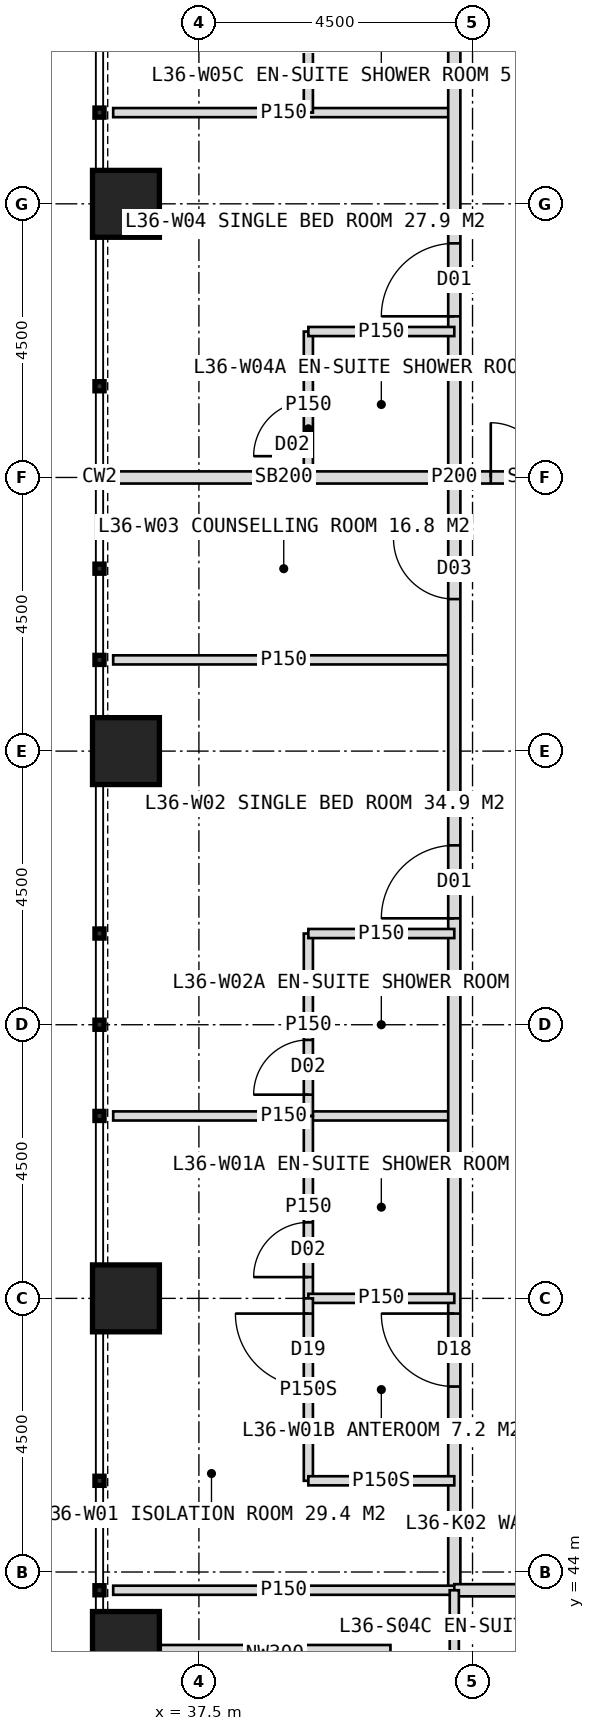
"""IFC4 building model, lengths in metres.
Left out: names, types, materials, properties, quantities, classifications, styles, units other than length and angle.
Written with IfcOpenShell. Run it as: python <this file> out.ifc"""

import sys

from ifc_helpers import new_model, si_unit, direction, frame, frame_2d, origin, origin_2d, place, context, subcontext, project, spatial, rectangle, hollow_rectangle, extrude, element, fill, save


model = new_model("IFC4")
c1 = context("Model", 3, precision=1e-05, world=origin(), true_north=direction((0.0, 1.0)))
c2 = subcontext(c1, "Body", "Model", "MODEL_VIEW")
j1 = project(units=[si_unit("LENGTHUNIT", "METRE"), si_unit("PLANEANGLEUNIT", "RADIAN")], contexts=[c1])
p1 = place(None, origin())
s1 = spatial("IfcSite", under=j1, at=p1, CompositionType="ELEMENT")
p2 = place(p1, origin())
s2 = spatial("IfcBuilding", under=s1, at=p2, CompositionType="ELEMENT")
p3 = place(p2, frame((0.0, 0.0, 152.0)))
s3 = spatial("IfcBuildingStorey", under=s2, at=p3, CompositionType="ELEMENT", Elevation=152.0)
for number, where, z_axis, x_axis in (
    (1, (36.3, 42.8, 0.0), (0.0, 0.0, 1.0), (1.0, 0.0, 0.0)),
    (2, (36.3, 48.5, 0.0), (0.0, 0.0, 1.0), (1.0, 0.0, 0.0)),
    (3, (36.3, 57.5, 0.0), (0.0, 0.0, 1.0), (1.0, 0.0, 0.0)),
    (4, (36.3, 66.5, 0.0), (0.0, 0.0, 1.0), (1.0, 0.0, 0.0)),
):
    element("IfcColumn", number, at=place(p3, frame(where, z_axis=z_axis, x_axis=x_axis)), inside=s3, PredefinedType="COLUMN", context=c2, shape_type="SweptSolid", body=[
        extrude(hollow_rectangle(XDim=1.1, YDim=1.1, WallThickness=0.1, at=origin_2d()), origin(), (0.0, 0.0, 1.0), 4.0),
    ])
p4 = place(p3, frame((40.65, 42.65, 0.0), z_axis=(0.0, 0.0, 1.0), x_axis=(-1.0, 0.0, 0.0)))
e5 = element("IfcWall", 5, at=p4, inside=s3, PredefinedType="ELEMENTEDWALL", context=c2, shape_type="SweptSolid", body=[
    extrude(rectangle(XDim=3.8, YDim=0.3, at=frame_2d((1.9, 0.0))), origin(), (0.0, 0.0, 1.0), 4.0),
])
for number, where, z_axis, x_axis in (
    (6, (41.7, 51.5, 0.0), (0.0, 0.0, 1.0), (-1.0, 0.0, 0.0)),
    (7, (41.7, 59.0, 0.0), (0.0, 0.0, 1.0), (-1.0, 0.0, 0.0)),
):
    element("IfcWall", number, at=place(p3, frame(where, z_axis=z_axis, x_axis=x_axis)), inside=s3, PredefinedType="PARTITIONING", context=c2, shape_type="SweptSolid", body=[
        extrude(rectangle(XDim=5.61, YDim=0.15, at=frame_2d((2.805, 0.0))), origin(), (0.0, 0.0, 1.0), 3.75),
    ])
p5 = place(p3, frame((41.7, 62.0, 0.0), z_axis=(0.0, 0.0, 1.0), x_axis=(-1.0, 0.0, 0.0)))
e8 = element("IfcWall", 8, at=p5, inside=s3, PredefinedType="SOLIDWALL", context=c2, shape_type="SweptSolid", body=[
    extrude(rectangle(XDim=5.61, YDim=0.2, at=frame_2d((2.805, 0.0))), origin(), (0.0, 0.0, 1.0), 2.95),
])
p6 = place(p3, frame((41.7, 68.0, 0.0), z_axis=(0.0, 0.0, 1.0), x_axis=(-1.0, 0.0, 0.0)))
e9 = element("IfcWall", 9, at=p6, inside=s3, PredefinedType="PARTITIONING", context=c2, shape_type="SweptSolid", body=[
    extrude(rectangle(XDim=5.61, YDim=0.15, at=frame_2d((2.805, 0.0))), origin(), (0.0, 0.0, 1.0), 3.75),
])
p7 = place(p3, frame((41.7, 43.7, 0.0), z_axis=(0.0, 0.0, 1.0), x_axis=(0.0, 1.0, 0.0)))
e10 = element("IfcWall", 10, at=p7, inside=s3, PredefinedType="PARTITIONING", context=c2, shape_type="SweptSolid", body=[
    extrude(rectangle(XDim=36.6, YDim=0.2, at=frame_2d((18.3, 0.0))), origin(), (0.0, 0.0, 1.0), 3.75),
])
p8 = place(p7, frame((3.35, 0.0, 0.0)))
e11 = element("IfcOpeningElement", 11, at=p8, cuts=e10, PredefinedType="OPENING", context=c2, shape_type="SweptSolid", body=[
    extrude(rectangle(XDim=1.2, YDim=2.2, at=frame_2d((0.6, 1.1))), frame((0.0, 0.11, 0.0), z_axis=(0.0, -1.0, 0.0), x_axis=(1.0, 0.0, 0.0)), (0.0, 0.0, 1.0), 0.22),
])
p9 = place(p7, frame((11.05, 0.0, 0.0)))
e12 = element("IfcOpeningElement", 12, at=p9, cuts=e10, PredefinedType="OPENING", context=c2, shape_type="SweptSolid", body=[
    extrude(rectangle(XDim=1.2, YDim=2.2, at=frame_2d((0.6, 1.1))), frame((0.0, 0.11, 0.0), z_axis=(0.0, -1.0, 0.0), x_axis=(1.0, 0.0, 0.0)), (0.0, 0.0, 1.0), 0.22),
])
p10 = place(p7, frame((16.3, 0.0, 0.0)))
e13 = element("IfcOpeningElement", 13, at=p10, cuts=e10, PredefinedType="OPENING", context=c2, shape_type="SweptSolid", body=[
    extrude(rectangle(XDim=1.0, YDim=2.1, at=frame_2d((0.5, 1.05))), frame((0.0, 0.11, 0.0), z_axis=(0.0, -1.0, 0.0), x_axis=(1.0, 0.0, 0.0)), (0.0, 0.0, 1.0), 0.22),
])
p11 = place(p7, frame((20.95, 0.0, 0.0)))
e14 = element("IfcOpeningElement", 14, at=p11, cuts=e10, PredefinedType="OPENING", context=c2, shape_type="SweptSolid", body=[
    extrude(rectangle(XDim=1.2, YDim=2.2, at=frame_2d((0.6, 1.1))), frame((0.0, 0.11, 0.0), z_axis=(0.0, -1.0, 0.0), x_axis=(1.0, 0.0, 0.0)), (0.0, 0.0, 1.0), 0.22),
])
p12 = place(p7, frame((32.75, 0.0, 0.0)))
e15 = element("IfcOpeningElement", 15, at=p12, cuts=e10, PredefinedType="OPENING", context=c2, shape_type="SweptSolid", body=[
    extrude(rectangle(XDim=1.2, YDim=2.2, at=frame_2d((0.6, 1.1))), frame((0.0, 0.11, 0.0), z_axis=(0.0, -1.0, 0.0), x_axis=(1.0, 0.0, 0.0)), (0.0, 0.0, 1.0), 0.22),
])
p13 = place(p3, frame((41.7, 43.7, 0.0), z_axis=(0.0, 0.0, 1.0), x_axis=(-1.0, 0.0, 0.0)))
e16 = element("IfcWall", 16, at=p13, inside=s3, PredefinedType="PARTITIONING", context=c2, shape_type="SweptSolid", body=[
    extrude(rectangle(XDim=5.61, YDim=0.15, at=frame_2d((2.805, 0.0))), origin(), (0.0, 0.0, 1.0), 3.75),
])
p14 = place(p3, frame((39.3, 48.5, 0.0), z_axis=(0.0, 0.0, 1.0), x_axis=(0.0, 1.0, 0.0)))
e17 = element("IfcWall", 17, at=p14, inside=s3, PredefinedType="PARTITIONING", context=c2, shape_type="SweptSolid", body=[
    extrude(rectangle(XDim=3.0, YDim=0.15, at=frame_2d((1.5, 0.0))), origin(), (0.0, 0.0, 1.0), 3.75),
])
p15 = place(p14, frame((0.35, 0.0, 0.0)))
e18 = element("IfcOpeningElement", 18, at=p15, cuts=e17, PredefinedType="OPENING", context=c2, shape_type="SweptSolid", body=[
    extrude(rectangle(XDim=0.9, YDim=2.1, at=frame_2d((0.45, 1.05))), frame((0.0, 0.085, 0.0), z_axis=(0.0, -1.0, 0.0), x_axis=(1.0, 0.0, 0.0)), (0.0, 0.0, 1.0), 0.17),
])
p16 = place(p3, frame((41.7, 48.5, 0.0), z_axis=(0.0, 0.0, 1.0), x_axis=(-1.0, 0.0, 0.0)))
e19 = element("IfcWall", 19, at=p16, inside=s3, PredefinedType="PARTITIONING", context=c2, shape_type="SweptSolid", body=[
    extrude(rectangle(XDim=2.4, YDim=0.15, at=frame_2d((1.2, 0.0))), origin(), (0.0, 0.0, 1.0), 2.95),
])
p17 = place(p3, frame((39.3, 45.5, 0.0), z_axis=(0.0, 0.0, 1.0), x_axis=(0.0, 1.0, 0.0)))
e20 = element("IfcWall", 20, at=p17, inside=s3, PredefinedType="PARTITIONING", context=c2, shape_type="SweptSolid", body=[
    extrude(rectangle(XDim=3.0, YDim=0.15, at=frame_2d((1.5, 0.0))), origin(), (0.0, 0.0, 1.0), 3.75),
])
p18 = place(p17, frame((1.55, 0.0, 0.0)))
e21 = element("IfcOpeningElement", 21, at=p18, cuts=e20, PredefinedType="OPENING", context=c2, shape_type="SweptSolid", body=[
    extrude(rectangle(XDim=1.2, YDim=2.2, at=frame_2d((0.6, 1.1))), frame((0.0, 0.085, 0.0), z_axis=(0.0, -1.0, 0.0), x_axis=(1.0, 0.0, 0.0)), (0.0, 0.0, 1.0), 0.17),
])
p19 = place(p3, frame((41.7, 45.5, 0.0), z_axis=(0.0, 0.0, 1.0), x_axis=(-1.0, 0.0, 0.0)))
e22 = element("IfcWall", 22, at=p19, inside=s3, PredefinedType="PARTITIONING", context=c2, shape_type="SweptSolid", body=[
    extrude(rectangle(XDim=2.4, YDim=0.15, at=frame_2d((1.2, 0.0))), origin(), (0.0, 0.0, 1.0), 3.75),
])
p20 = place(p3, frame((39.3, 51.5, 0.0), z_axis=(0.0, 0.0, 1.0), x_axis=(0.0, 1.0, 0.0)))
e23 = element("IfcWall", 23, at=p20, inside=s3, PredefinedType="PARTITIONING", context=c2, shape_type="SweptSolid", body=[
    extrude(rectangle(XDim=3.0, YDim=0.15, at=frame_2d((1.5, 0.0))), origin(), (0.0, 0.0, 1.0), 3.75),
])
p21 = place(p20, frame((0.35, 0.0, 0.0)))
e24 = element("IfcOpeningElement", 24, at=p21, cuts=e23, PredefinedType="OPENING", context=c2, shape_type="SweptSolid", body=[
    extrude(rectangle(XDim=0.9, YDim=2.1, at=frame_2d((0.45, 1.05))), frame((0.0, 0.085, 0.0), z_axis=(0.0, -1.0, 0.0), x_axis=(1.0, 0.0, 0.0)), (0.0, 0.0, 1.0), 0.17),
])
p22 = place(p3, frame((41.7, 54.5, 0.0), z_axis=(0.0, 0.0, 1.0), x_axis=(-1.0, 0.0, 0.0)))
e25 = element("IfcWall", 25, at=p22, inside=s3, PredefinedType="PARTITIONING", context=c2, shape_type="SweptSolid", body=[
    extrude(rectangle(XDim=2.4, YDim=0.15, at=frame_2d((1.2, 0.0))), origin(), (0.0, 0.0, 1.0), 3.75),
])
p23 = place(p3, frame((39.3, 62.0, 0.0), z_axis=(0.0, 0.0, 1.0), x_axis=(0.0, 1.0, 0.0)))
e26 = element("IfcWall", 26, at=p23, inside=s3, PredefinedType="PARTITIONING", context=c2, shape_type="SweptSolid", body=[
    extrude(rectangle(XDim=2.4, YDim=0.15, at=frame_2d((1.2, 0.0))), origin(), (0.0, 0.0, 1.0), 3.75),
])
p24 = place(p23, frame((0.35, 0.0, 0.0)))
e27 = element("IfcOpeningElement", 27, at=p24, cuts=e26, PredefinedType="OPENING", context=c2, shape_type="SweptSolid", body=[
    extrude(rectangle(XDim=0.9, YDim=2.1, at=frame_2d((0.45, 1.05))), frame((0.0, 0.085, 0.0), z_axis=(0.0, -1.0, 0.0), x_axis=(1.0, 0.0, 0.0)), (0.0, 0.0, 1.0), 0.17),
])
p25 = place(p3, frame((41.7, 64.4, 0.0), z_axis=(0.0, 0.0, 1.0), x_axis=(-1.0, 0.0, 0.0)))
e28 = element("IfcWall", 28, at=p25, inside=s3, PredefinedType="PARTITIONING", context=c2, shape_type="SweptSolid", body=[
    extrude(rectangle(XDim=2.4, YDim=0.15, at=frame_2d((1.2, 0.0))), origin(), (0.0, 0.0, 1.0), 3.75),
])
p26 = place(p3, frame((39.3, 68.0, 0.0), z_axis=(0.0, 0.0, 1.0), x_axis=(0.0, 1.0, 0.0)))
e29 = element("IfcWall", 29, at=p26, inside=s3, PredefinedType="PARTITIONING", context=c2, shape_type="SweptSolid", body=[
    extrude(rectangle(XDim=2.4, YDim=0.15, at=frame_2d((1.2, 0.0))), origin(), (0.0, 0.0, 1.0), 3.75),
])
p27 = place(p26, frame((1.15, 0.0, 0.0)))
e30 = element("IfcOpeningElement", 30, at=p27, cuts=e29, PredefinedType="OPENING", context=c2, shape_type="SweptSolid", body=[
    extrude(rectangle(XDim=0.9, YDim=2.1, at=frame_2d((0.45, 1.05))), frame((0.0, 0.085, 0.0), z_axis=(0.0, -1.0, 0.0), x_axis=(1.0, 0.0, 0.0)), (0.0, 0.0, 1.0), 0.17),
])
p28 = place(p3, frame((78.3, 43.7, 0.0), z_axis=(0.0, 0.0, 1.0), x_axis=(-1.0, 0.0, 0.0)))
e31 = element("IfcWall", 31, at=p28, inside=s3, PredefinedType="PARTITIONING", context=c2, shape_type="SweptSolid", body=[
    extrude(rectangle(XDim=36.6, YDim=0.2, at=frame_2d((18.3, 0.0))), origin(), (0.0, 0.0, 1.0), 3.75),
])
p29 = place(p28, frame((3.35, 0.0, 0.0)))
e32 = element("IfcOpeningElement", 32, at=p29, cuts=e31, PredefinedType="OPENING", context=c2, shape_type="SweptSolid", body=[
    extrude(rectangle(XDim=1.2, YDim=2.2, at=frame_2d((0.6, 1.1))), frame((0.0, 0.11, 0.0), z_axis=(0.0, -1.0, 0.0), x_axis=(1.0, 0.0, 0.0)), (0.0, 0.0, 1.0), 0.22),
])
p30 = place(p28, frame((11.05, 0.0, 0.0)))
e33 = element("IfcOpeningElement", 33, at=p30, cuts=e31, PredefinedType="OPENING", context=c2, shape_type="SweptSolid", body=[
    extrude(rectangle(XDim=1.2, YDim=2.2, at=frame_2d((0.6, 1.1))), frame((0.0, 0.11, 0.0), z_axis=(0.0, -1.0, 0.0), x_axis=(1.0, 0.0, 0.0)), (0.0, 0.0, 1.0), 0.22),
])
p31 = place(p28, frame((19.85, 0.0, 0.0)))
e34 = element("IfcOpeningElement", 34, at=p31, cuts=e31, PredefinedType="OPENING", context=c2, shape_type="SweptSolid", body=[
    extrude(rectangle(XDim=1.2, YDim=2.2, at=frame_2d((0.6, 1.1))), frame((0.0, 0.11, 0.0), z_axis=(0.0, -1.0, 0.0), x_axis=(1.0, 0.0, 0.0)), (0.0, 0.0, 1.0), 0.22),
])
p32 = place(p28, frame((26.95, 0.0, 0.0)))
e35 = element("IfcOpeningElement", 35, at=p32, cuts=e31, PredefinedType="OPENING", context=c2, shape_type="SweptSolid", body=[
    extrude(rectangle(XDim=1.2, YDim=2.2, at=frame_2d((0.6, 1.1))), frame((0.0, 0.11, 0.0), z_axis=(0.0, -1.0, 0.0), x_axis=(1.0, 0.0, 0.0)), (0.0, 0.0, 1.0), 0.22),
])
p33 = place(p3, frame((41.7, 43.7, 0.0), z_axis=(0.0, 0.0, 1.0), x_axis=(0.0, -1.0, 0.0)))
e36 = element("IfcWall", 36, at=p33, inside=s3, PredefinedType="PARTITIONING", context=c2, shape_type="SweptSolid", body=[
    extrude(rectangle(XDim=2.4, YDim=0.15, at=frame_2d((1.2, 0.0))), origin(), (0.0, 0.0, 1.0), 3.75),
])
p34 = place(p3, frame((44.4, 62.0, 0.0), z_axis=(0.0, 0.0, 1.0), x_axis=(-1.0, 0.0, 0.0)))
e37 = element("IfcWall", 37, at=p34, inside=s3, PredefinedType="SOLIDWALL", context=c2, shape_type="SweptSolid", body=[
    extrude(rectangle(XDim=2.7, YDim=0.2, at=frame_2d((1.35, 0.0))), origin(), (0.0, 0.0, 1.0), 2.95),
])
p35 = place(p34, frame((0.3, 0.0, 0.0)))
e38 = element("IfcOpeningElement", 38, at=p35, cuts=e37, PredefinedType="OPENING", context=c2, shape_type="SweptSolid", body=[
    extrude(rectangle(XDim=1.8, YDim=2.2, at=frame_2d((0.9, 1.1))), frame((0.0, 0.11, 0.0), z_axis=(0.0, -1.0, 0.0), x_axis=(1.0, 0.0, 0.0)), (0.0, 0.0, 1.0), 0.22),
])
p36 = place(p18, origin())
e39 = element("IfcDoor", 39, at=p36, inside=s3, OperationType="SINGLE_SWING_RIGHT", PredefinedType="DOOR", context=c2, shape_type="SweptSolid", body=[
    extrude(rectangle(XDim=1.2, YDim=2.2, at=frame_2d((0.6, 1.1))), frame((0.0, 0.025, 0.0), z_axis=(0.0, -1.0, 0.0), x_axis=(1.0, 0.0, 0.0)), (0.0, 0.0, 1.0), 0.05),
])
fill(e21, e39)
p37 = place(p8, origin())
e40 = element("IfcDoor", 40, at=p37, inside=s3, OperationType="SINGLE_SWING_RIGHT", PredefinedType="DOOR", context=c2, shape_type="SweptSolid", body=[
    extrude(rectangle(XDim=1.2, YDim=2.2, at=frame_2d((0.6, 1.1))), frame((0.0, 0.025, 0.0), z_axis=(0.0, -1.0, 0.0), x_axis=(1.0, 0.0, 0.0)), (0.0, 0.0, 1.0), 0.05),
])
fill(e11, e40)
p38 = place(p15, origin())
e41 = element("IfcDoor", 41, at=p38, inside=s3, OperationType="SINGLE_SWING_LEFT", PredefinedType="DOOR", context=c2, shape_type="SweptSolid", body=[
    extrude(rectangle(XDim=0.9, YDim=2.1, at=frame_2d((0.45, 1.05))), frame((0.0, 0.025, 0.0), z_axis=(0.0, -1.0, 0.0), x_axis=(1.0, 0.0, 0.0)), (0.0, 0.0, 1.0), 0.05),
])
fill(e18, e41)
p39 = place(p9, origin())
e42 = element("IfcDoor", 42, at=p39, inside=s3, OperationType="SINGLE_SWING_LEFT", PredefinedType="DOOR", context=c2, shape_type="SweptSolid", body=[
    extrude(rectangle(XDim=1.2, YDim=2.2, at=frame_2d((0.6, 1.1))), frame((0.0, 0.025, 0.0), z_axis=(0.0, -1.0, 0.0), x_axis=(1.0, 0.0, 0.0)), (0.0, 0.0, 1.0), 0.05),
])
fill(e12, e42)
p40 = place(p21, origin())
e43 = element("IfcDoor", 43, at=p40, inside=s3, OperationType="SINGLE_SWING_LEFT", PredefinedType="DOOR", context=c2, shape_type="SweptSolid", body=[
    extrude(rectangle(XDim=0.9, YDim=2.1, at=frame_2d((0.45, 1.05))), frame((0.0, 0.025, 0.0), z_axis=(0.0, -1.0, 0.0), x_axis=(1.0, 0.0, 0.0)), (0.0, 0.0, 1.0), 0.05),
])
fill(e24, e43)
p41 = place(p10, origin())
e44 = element("IfcDoor", 44, at=p41, inside=s3, OperationType="SINGLE_SWING_RIGHT", PredefinedType="DOOR", context=c2, shape_type="SweptSolid", body=[
    extrude(rectangle(XDim=1.0, YDim=2.1, at=frame_2d((0.5, 1.05))), frame((0.0, 0.025, 0.0), z_axis=(0.0, -1.0, 0.0), x_axis=(1.0, 0.0, 0.0)), (0.0, 0.0, 1.0), 0.05),
])
fill(e13, e44)
p42 = place(p11, origin())
e45 = element("IfcDoor", 45, at=p42, inside=s3, OperationType="SINGLE_SWING_LEFT", PredefinedType="DOOR", context=c2, shape_type="SweptSolid", body=[
    extrude(rectangle(XDim=1.2, YDim=2.2, at=frame_2d((0.6, 1.1))), frame((0.0, 0.025, 0.0), z_axis=(0.0, -1.0, 0.0), x_axis=(1.0, 0.0, 0.0)), (0.0, 0.0, 1.0), 0.05),
])
fill(e14, e45)
p43 = place(p24, origin())
e46 = element("IfcDoor", 46, at=p43, inside=s3, OperationType="SINGLE_SWING_LEFT", PredefinedType="DOOR", context=c2, shape_type="SweptSolid", body=[
    extrude(rectangle(XDim=0.9, YDim=2.1, at=frame_2d((0.45, 1.05))), frame((0.0, 0.025, 0.0), z_axis=(0.0, -1.0, 0.0), x_axis=(1.0, 0.0, 0.0)), (0.0, 0.0, 1.0), 0.05),
])
fill(e27, e46)
p44 = place(p35, origin())
e47 = element("IfcDoor", 47, at=p44, inside=s3, OperationType="DOUBLE_DOOR_DOUBLE_SWING", PredefinedType="DOOR", context=c2, shape_type="SweptSolid", body=[
    extrude(rectangle(XDim=1.8, YDim=2.2, at=frame_2d((0.9, 1.1))), frame((0.0, 0.025, 0.0), z_axis=(0.0, -1.0, 0.0), x_axis=(1.0, 0.0, 0.0)), (0.0, 0.0, 1.0), 0.05),
])
fill(e38, e47)
save(model, sys.argv[1])
